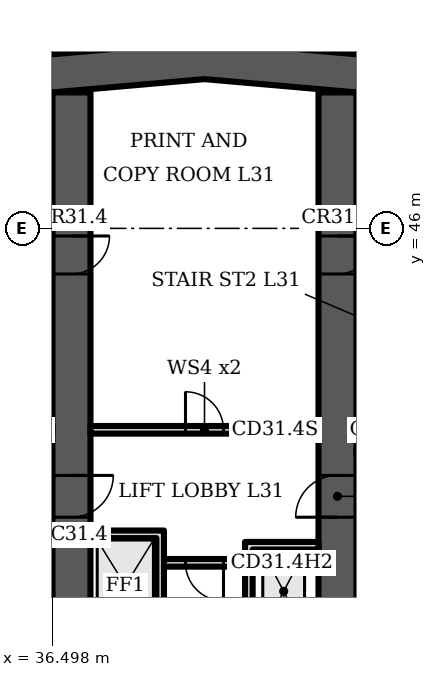
"""IFC4 building model, lengths in metres.
Left out: names, types, materials, properties, quantities, classifications, styles, units other than length and angle.
Written with IfcOpenShell. Run it as: python <this file> out.ifc"""

import sys

from ifc_helpers import new_model, si_unit, direction, frame, frame_2d, origin, place, context, subcontext, project, spatial, polyline, rectangle, outline, extrude, element, fill, save


model = new_model("IFC4")
c1 = context("Model", 3, precision=1e-05, world=origin(), true_north=direction((0.0, 1.0)))
c2 = subcontext(c1, "Body", "Model", "MODEL_VIEW")
j1 = project(units=[si_unit("LENGTHUNIT", "METRE"), si_unit("PLANEANGLEUNIT", "RADIAN")], contexts=[c1])
p1 = place(None, origin())
s1 = spatial("IfcSite", under=j1, at=p1, CompositionType="ELEMENT")
p2 = place(p1, origin())
s2 = spatial("IfcBuilding", under=s1, at=p2, CompositionType="ELEMENT")
p3 = place(p2, frame((0.0, 0.0, 132.7)))
s3 = spatial("IfcBuildingStorey", under=s2, at=p3, CompositionType="ELEMENT", Elevation=132.7)
p4 = place(p3, origin())
e1 = element("IfcWall", 1, at=p4, inside=s3, PredefinedType="SHEAR", context=c2, shape_type="SweptSolid", body=[
    extrude(outline(polyline([(16.0, 47.784), (40.5, 49.927), (65.0, 47.784), (65.0, 48.787), (40.5, 50.931), (16.0, 48.787), (16.0, 47.784)])), origin(), (0.0, 0.0, 1.0), 3.6),
])
p5 = place(p3, frame((37.0, 35.0, 0.0), z_axis=(0.0, 0.0, 1.0), x_axis=(0.0, 1.0, 0.0)))
e2 = element("IfcWall", 2, at=p5, inside=s3, PredefinedType="SHEAR", context=c2, shape_type="SweptSolid", body=[
    extrude(rectangle(XDim=14.577, YDim=1.0, at=frame_2d((7.289, 0.0))), origin(), (0.0, 0.0, 1.0), 3.6),
])
p6 = place(p5, frame((3.4, 0.0, 0.0)))
e3 = element("IfcOpeningElement", 3, at=p6, cuts=e2, PredefinedType="OPENING", context=c2, shape_type="SweptSolid", body=[
    extrude(rectangle(XDim=1.1, YDim=2.1, at=frame_2d((0.55, 1.05))), frame((0.0, 0.51, 0.0), z_axis=(0.0, -1.0, 0.0), x_axis=(1.0, 0.0, 0.0)), (0.0, 0.0, 1.0), 1.02),
])
p7 = place(p5, frame((9.8, 0.0, 0.0)))
e4 = element("IfcOpeningElement", 4, at=p7, cuts=e2, PredefinedType="OPENING", context=c2, shape_type="SweptSolid", body=[
    extrude(rectangle(XDim=1.0, YDim=2.1, at=frame_2d((0.5, 1.05))), frame((0.0, 0.51, 0.0), z_axis=(0.0, -1.0, 0.0), x_axis=(1.0, 0.0, 0.0)), (0.0, 0.0, 1.0), 1.02),
])
p8 = place(p3, frame((44.0, 35.0, 0.0), z_axis=(0.0, 0.0, 1.0), x_axis=(0.0, 1.0, 0.0)))
e5 = element("IfcWall", 5, at=p8, inside=s3, PredefinedType="SHEAR", context=c2, shape_type="SweptSolid", body=[
    extrude(rectangle(XDim=14.577, YDim=1.0, at=frame_2d((7.289, 0.0))), origin(), (0.0, 0.0, 1.0), 3.6),
])
p9 = place(p8, frame((3.4, 0.0, 0.0)))
e6 = element("IfcOpeningElement", 6, at=p9, cuts=e5, PredefinedType="OPENING", context=c2, shape_type="SweptSolid", body=[
    extrude(rectangle(XDim=1.1, YDim=2.1, at=frame_2d((0.55, 1.05))), frame((0.0, 0.51, 0.0), z_axis=(0.0, -1.0, 0.0), x_axis=(1.0, 0.0, 0.0)), (0.0, 0.0, 1.0), 1.02),
])
p10 = place(p8, frame((9.8, 0.0, 0.0)))
e7 = element("IfcOpeningElement", 7, at=p10, cuts=e5, PredefinedType="OPENING", context=c2, shape_type="SweptSolid", body=[
    extrude(rectangle(XDim=1.0, YDim=2.1, at=frame_2d((0.5, 1.05))), frame((0.0, 0.51, 0.0), z_axis=(0.0, -1.0, 0.0), x_axis=(1.0, 0.0, 0.0)), (0.0, 0.0, 1.0), 1.02),
])
p11 = place(p3, frame((39.433, 37.2, 0.0), z_axis=(0.0, 0.0, 1.0), x_axis=(1.0, 0.0, 0.0)))
e8 = element("IfcWall", 8, at=p11, inside=s3, PredefinedType="PARTITIONING", context=c2, shape_type="SweptSolid", body=[
    extrude(rectangle(XDim=2.133, YDim=0.2, at=frame_2d((1.067, 0.0))), origin(), (0.0, 0.0, 1.0), 3.2),
])
p12 = place(p11, frame((0.567, 0.0, 0.0)))
e9 = element("IfcOpeningElement", 9, at=p12, cuts=e8, PredefinedType="OPENING", context=c2, shape_type="SweptSolid", body=[
    extrude(rectangle(XDim=1.0, YDim=2.1, at=frame_2d((0.5, 1.05))), frame((0.0, 0.11, 0.0), z_axis=(0.0, -1.0, 0.0), x_axis=(1.0, 0.0, 0.0)), (0.0, 0.0, 1.0), 0.22),
])
p13 = place(p3, frame((37.5, 40.7, 0.0), z_axis=(0.0, 0.0, 1.0), x_axis=(1.0, 0.0, 0.0)))
e10 = element("IfcWall", 10, at=p13, inside=s3, PredefinedType="PARTITIONING", context=c2, shape_type="SweptSolid", body=[
    extrude(rectangle(XDim=6.0, YDim=0.2, at=frame_2d((3.0, 0.0))), origin(), (0.0, 0.0, 1.0), 3.2),
])
p14 = place(p13, frame((2.5, 0.0, 0.0)))
e11 = element("IfcOpeningElement", 11, at=p14, cuts=e10, PredefinedType="OPENING", context=c2, shape_type="SweptSolid", body=[
    extrude(rectangle(XDim=1.0, YDim=2.1, at=frame_2d((0.5, 1.05))), frame((0.0, 0.11, 0.0), z_axis=(0.0, -1.0, 0.0), x_axis=(1.0, 0.0, 0.0)), (0.0, 0.0, 1.0), 0.22),
])
p15 = place(p3, frame((0.0, 0.0, -0.0)))
e12 = element("IfcWall", 12, at=p15, inside=s3, PredefinedType="PARTITIONING", context=c2, shape_type="SweptSolid", body=[
    extrude(outline(polyline([(41.567, 37.75), (41.767, 37.75), (43.5, 37.75), (43.5, 37.55), (41.767, 37.55), (41.767, 35.0), (41.567, 35.0), (41.567, 37.75)])), origin(), (0.0, 0.0, 1.0), 3.2),
])
p16 = place(p3, frame((0.0, 0.0, -0.0)))
e13 = element("IfcWall", 13, at=p16, inside=s3, PredefinedType="PARTITIONING", context=c2, shape_type="SweptSolid", body=[
    extrude(outline(polyline([(39.233, 37.85), (37.5, 37.85), (37.5, 38.05), (39.233, 38.05), (39.433, 38.05), (39.433, 35.0), (39.233, 35.0), (39.233, 37.85)])), origin(), (0.0, 0.0, 1.0), 3.2),
])
p17 = place(p12, origin())
e14 = element("IfcDoor", 14, at=p17, inside=s3, OperationType="SINGLE_SWING_RIGHT", PredefinedType="DOOR", context=c2, shape_type="SweptSolid", body=[
    extrude(rectangle(XDim=1.0, YDim=2.1, at=frame_2d((0.5, 1.05))), frame((0.0, 0.025, 0.0), z_axis=(0.0, -1.0, 0.0), x_axis=(1.0, 0.0, 0.0)), (0.0, 0.0, 1.0), 0.05),
])
fill(e9, e14)
p18 = place(p14, origin())
e15 = element("IfcDoor", 15, at=p18, inside=s3, OperationType="SINGLE_SWING_LEFT", PredefinedType="DOOR", context=c2, shape_type="SweptSolid", body=[
    extrude(rectangle(XDim=1.0, YDim=2.1, at=frame_2d((0.5, 1.05))), frame((0.0, 0.025, 0.0), z_axis=(0.0, -1.0, 0.0), x_axis=(1.0, 0.0, 0.0)), (0.0, 0.0, 1.0), 0.05),
])
fill(e11, e15)
p19 = place(p6, origin())
e16 = element("IfcDoor", 16, at=p19, inside=s3, OperationType="SINGLE_SWING_RIGHT", PredefinedType="DOOR", context=c2, shape_type="SweptSolid", body=[
    extrude(rectangle(XDim=1.1, YDim=2.1, at=frame_2d((0.55, 1.05))), frame((0.0, 0.025, 0.0), z_axis=(0.0, -1.0, 0.0), x_axis=(1.0, 0.0, 0.0)), (0.0, 0.0, 1.0), 0.05),
])
fill(e3, e16)
p20 = place(p7, origin())
e17 = element("IfcDoor", 17, at=p20, inside=s3, OperationType="SINGLE_SWING_RIGHT", PredefinedType="DOOR", context=c2, shape_type="SweptSolid", body=[
    extrude(rectangle(XDim=1.0, YDim=2.1, at=frame_2d((0.5, 1.05))), frame((0.0, 0.5, 0.0), z_axis=(0.0, -1.0, 0.0), x_axis=(1.0, 0.0, 0.0)), (0.0, 0.0, 1.0), 1.0),
])
fill(e4, e17)
p21 = place(p9, origin())
e18 = element("IfcDoor", 18, at=p21, inside=s3, OperationType="SINGLE_SWING_LEFT", PredefinedType="DOOR", context=c2, shape_type="SweptSolid", body=[
    extrude(rectangle(XDim=1.1, YDim=2.1, at=frame_2d((0.55, 1.05))), frame((0.0, 0.025, 0.0), z_axis=(0.0, -1.0, 0.0), x_axis=(1.0, 0.0, 0.0)), (0.0, 0.0, 1.0), 0.05),
])
fill(e6, e18)
p22 = place(p10, origin())
e19 = element("IfcDoor", 19, at=p22, inside=s3, OperationType="SINGLE_SWING_RIGHT", PredefinedType="DOOR", context=c2, shape_type="SweptSolid", body=[
    extrude(rectangle(XDim=1.0, YDim=2.1, at=frame_2d((0.5, 1.05))), frame((0.0, 0.5, 0.0), z_axis=(0.0, -1.0, 0.0), x_axis=(1.0, 0.0, 0.0)), (0.0, 0.0, 1.0), 1.0),
])
fill(e7, e19)
save(model, sys.argv[1])
